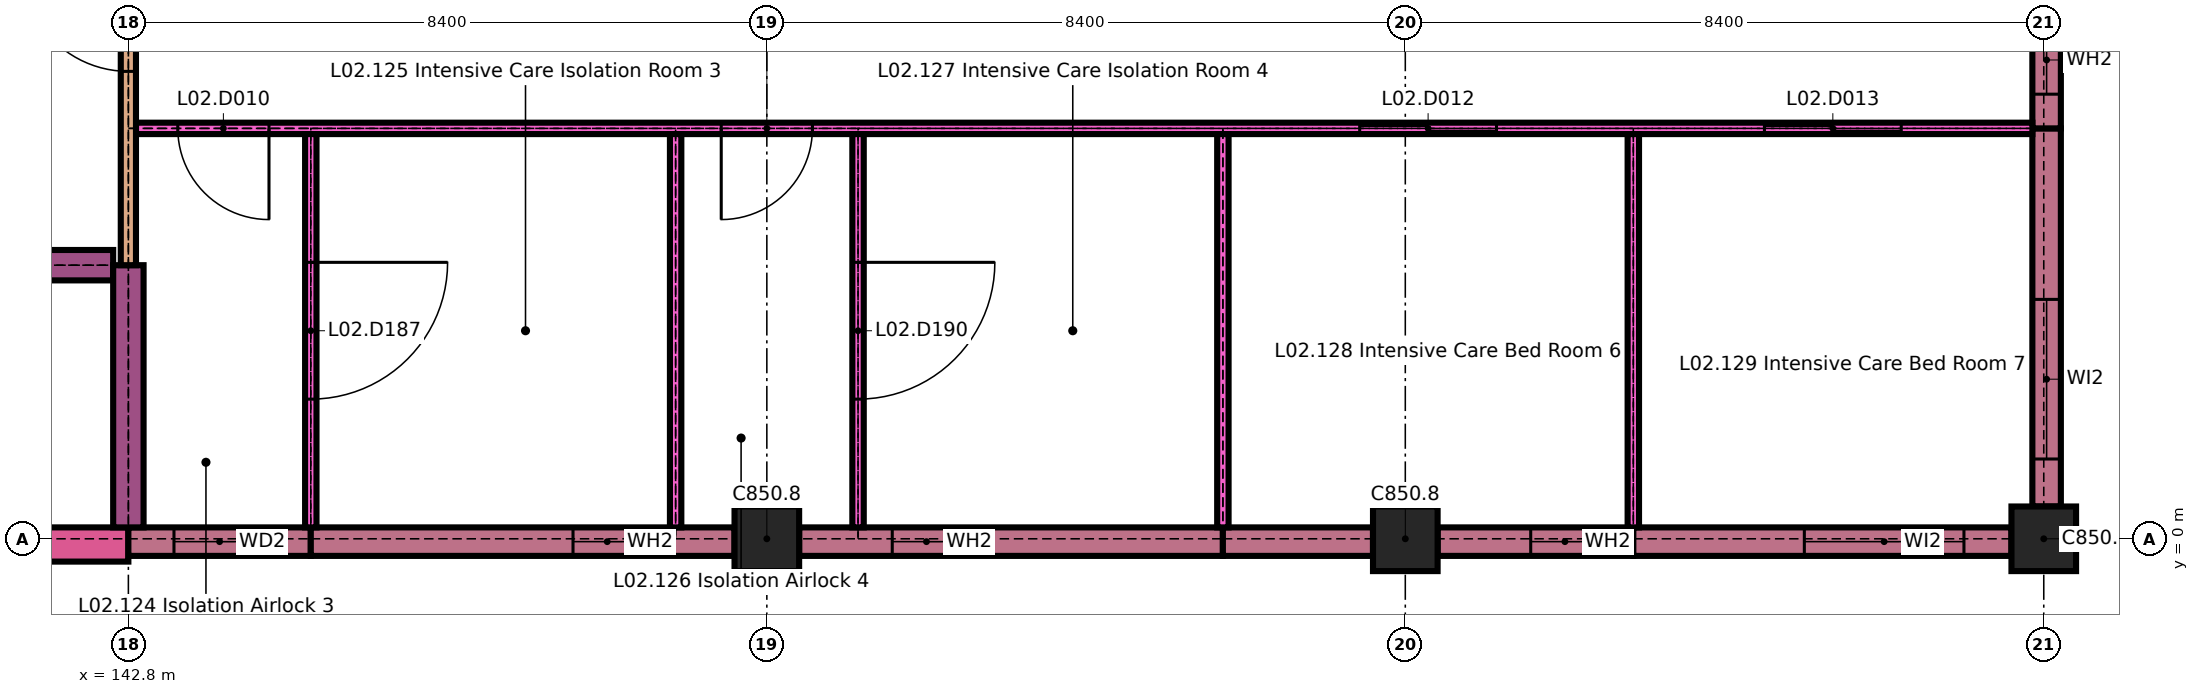
"""IFC4 building model, lengths in metres.
Left out: names, types, materials, properties, quantities, classifications, styles, units other than length and angle.
Written with IfcOpenShell. Run it as: python <this file> out.ifc"""

import sys

from ifc_helpers import new_model, si_unit, direction, frame, frame_2d, origin, origin_2d, place, context, subcontext, project, spatial, rectangle, extrude, element, fill, save


model = new_model("IFC4")
c1 = context("Model", 3, precision=1e-05, world=origin(), true_north=direction((0.0, 1.0)))
c2 = subcontext(c1, "Body", "Model", "MODEL_VIEW")
j1 = project(units=[si_unit("LENGTHUNIT", "METRE"), si_unit("PLANEANGLEUNIT", "RADIAN")], contexts=[c1])
p1 = place(None, origin())
s1 = spatial("IfcSite", under=j1, at=p1, CompositionType="ELEMENT")
p2 = place(p1, origin())
s2 = spatial("IfcBuilding", under=s1, at=p2, CompositionType="ELEMENT")
p3 = place(p2, frame((0.0, 0.0, 8.4)))
s3 = spatial("IfcBuildingStorey", under=s2, at=p3, CompositionType="ELEMENT", Elevation=8.4)
for number, where, z_axis, x_axis in (
    (1, (151.2, 0.0, 0.0), (0.0, 0.0, 1.0), (1.0, 0.0, 0.0)),
    (2, (159.6, 0.0, 0.0), (0.0, 0.0, 1.0), (1.0, 0.0, 0.0)),
    (3, (168.0, 0.0, 0.0), (0.0, 0.0, 1.0), (1.0, 0.0, 0.0)),
):
    element("IfcColumn", number, at=place(p3, frame(where, z_axis=z_axis, x_axis=x_axis)), inside=s3, PredefinedType="COLUMN", context=c2, shape_type="SweptSolid", body=[
        extrude(rectangle(XDim=0.85, YDim=0.85, at=origin_2d()), origin(), (0.0, 0.0, 1.0), 4.2),
    ])
p4 = place(p3, frame((138.95, -0.075, 0.0), z_axis=(0.0, 0.0, 1.0), x_axis=(1.0, 0.0, 0.0)))
e4 = element("IfcWall", 4, at=p4, inside=s3, PredefinedType="SOLIDWALL", context=c2, shape_type="SweptSolid", body=[
    extrude(rectangle(XDim=3.85, YDim=0.45, at=frame_2d((1.925, 0.0))), origin(), (0.0, 0.0, 1.0), 4.2),
])
p5 = place(p3, frame((142.8, -0.038, 0.0), z_axis=(0.0, 0.0, 1.0), x_axis=(1.0, 0.0, 0.0)))
e5 = element("IfcWall", 5, at=p5, inside=s3, PredefinedType="SOLIDWALL", context=c2, shape_type="SweptSolid", body=[
    extrude(rectangle(XDim=2.4, YDim=0.375, at=frame_2d((1.2, 0.0))), origin(), (0.0, 0.0, 1.0), 3.9),
])
p6 = place(p5, frame((0.6, 0.0, 0.9)))
e6 = element("IfcOpeningElement", 6, at=p6, cuts=e5, PredefinedType="OPENING", context=c2, shape_type="SweptSolid", body=[
    extrude(rectangle(XDim=1.2, YDim=2.1, at=frame_2d((0.6, 1.05))), frame((0.0, 0.198, 0.0), z_axis=(0.0, -1.0, 0.0), x_axis=(1.0, 0.0, 0.0)), (0.0, 0.0, 1.0), 0.395),
])
p7 = place(p3, frame((145.2, -0.038, 0.0), z_axis=(0.0, 0.0, 1.0), x_axis=(1.0, 0.0, 0.0)))
e7 = element("IfcWall", 7, at=p7, inside=s3, PredefinedType="SOLIDWALL", context=c2, shape_type="SweptSolid", body=[
    extrude(rectangle(XDim=5.575, YDim=0.375, at=frame_2d((2.788, 0.0))), origin(), (0.0, 0.0, 1.0), 3.9),
])
p8 = place(p7, frame((3.45, 0.0, 0.9)))
e8 = element("IfcOpeningElement", 8, at=p8, cuts=e7, PredefinedType="OPENING", context=c2, shape_type="SweptSolid", body=[
    extrude(rectangle(XDim=0.9, YDim=2.1, at=frame_2d((0.45, 1.05))), frame((0.0, 0.198, 0.0), z_axis=(0.0, -1.0, 0.0), x_axis=(1.0, 0.0, 0.0)), (0.0, 0.0, 1.0), 0.395),
])
p9 = place(p3, frame((151.625, -0.038, 0.0), z_axis=(0.0, 0.0, 1.0), x_axis=(1.0, 0.0, 0.0)))
e9 = element("IfcWall", 9, at=p9, inside=s3, PredefinedType="SOLIDWALL", context=c2, shape_type="SweptSolid", body=[
    extrude(rectangle(XDim=5.575, YDim=0.375, at=frame_2d((2.788, 0.0))), origin(), (0.0, 0.0, 1.0), 3.9),
])
p10 = place(p9, frame((1.225, 0.0, 0.9)))
e10 = element("IfcOpeningElement", 10, at=p10, cuts=e9, PredefinedType="OPENING", context=c2, shape_type="SweptSolid", body=[
    extrude(rectangle(XDim=0.9, YDim=2.1, at=frame_2d((0.45, 1.05))), frame((0.0, 0.198, 0.0), z_axis=(0.0, -1.0, 0.0), x_axis=(1.0, 0.0, 0.0)), (0.0, 0.0, 1.0), 0.395),
])
p11 = place(p3, frame((157.2, -0.038, 0.0), z_axis=(0.0, 0.0, 1.0), x_axis=(1.0, 0.0, 0.0)))
e11 = element("IfcWall", 11, at=p11, inside=s3, PredefinedType="SOLIDWALL", context=c2, shape_type="SweptSolid", body=[
    extrude(rectangle(XDim=1.975, YDim=0.375, at=frame_2d((0.988, 0.0))), origin(), (0.0, 0.0, 1.0), 3.9),
])
p12 = place(p3, frame((160.025, -0.038, 0.0), z_axis=(0.0, 0.0, 1.0), x_axis=(1.0, 0.0, 0.0)))
e12 = element("IfcWall", 12, at=p12, inside=s3, PredefinedType="SOLIDWALL", context=c2, shape_type="SweptSolid", body=[
    extrude(rectangle(XDim=2.575, YDim=0.375, at=frame_2d((1.288, 0.0))), origin(), (0.0, 0.0, 1.0), 3.9),
])
p13 = place(p12, frame((1.225, 0.0, 0.9)))
e13 = element("IfcOpeningElement", 13, at=p13, cuts=e12, PredefinedType="OPENING", context=c2, shape_type="SweptSolid", body=[
    extrude(rectangle(XDim=0.9, YDim=2.1, at=frame_2d((0.45, 1.05))), frame((0.0, 0.198, 0.0), z_axis=(0.0, -1.0, 0.0), x_axis=(1.0, 0.0, 0.0)), (0.0, 0.0, 1.0), 0.395),
])
p14 = place(p3, frame((162.6, -0.038, 0.0), z_axis=(0.0, 0.0, 1.0), x_axis=(1.0, 0.0, 0.0)))
e14 = element("IfcWall", 14, at=p14, inside=s3, PredefinedType="SOLIDWALL", context=c2, shape_type="SweptSolid", body=[
    extrude(rectangle(XDim=4.975, YDim=0.375, at=frame_2d((2.487, 0.0))), origin(), (0.0, 0.0, 1.0), 3.9),
])
p15 = place(p14, frame((2.25, 0.0, 0.9)))
e15 = element("IfcOpeningElement", 15, at=p15, cuts=e14, PredefinedType="OPENING", context=c2, shape_type="SweptSolid", body=[
    extrude(rectangle(XDim=2.1, YDim=2.1, at=frame_2d((1.05, 1.05))), frame((0.0, 0.198, 0.0), z_axis=(0.0, -1.0, 0.0), x_axis=(1.0, 0.0, 0.0)), (0.0, 0.0, 1.0), 0.395),
])
p16 = place(p3, frame((168.038, 0.425, 0.0), z_axis=(0.0, 0.0, 1.0), x_axis=(0.0, 1.0, 0.0)))
e16 = element("IfcWall", 16, at=p16, inside=s3, PredefinedType="SOLIDWALL", context=c2, shape_type="SweptSolid", body=[
    extrude(rectangle(XDim=4.975, YDim=0.375, at=frame_2d((2.487, 0.0))), origin(), (0.0, 0.0, 1.0), 3.9),
])
p17 = place(p16, frame((0.625, 0.0, 0.9)))
e17 = element("IfcOpeningElement", 17, at=p17, cuts=e16, PredefinedType="OPENING", context=c2, shape_type="SweptSolid", body=[
    extrude(rectangle(XDim=2.1, YDim=2.1, at=frame_2d((1.05, 1.05))), frame((0.0, 0.198, 0.0), z_axis=(0.0, -1.0, 0.0), x_axis=(1.0, 0.0, 0.0)), (0.0, 0.0, 1.0), 0.395),
])
p18 = place(p3, frame((168.038, 5.4, 0.0), z_axis=(0.0, 0.0, 1.0), x_axis=(0.0, 1.0, 0.0)))
e18 = element("IfcWall", 18, at=p18, inside=s3, PredefinedType="SOLIDWALL", context=c2, shape_type="SweptSolid", body=[
    extrude(rectangle(XDim=2.575, YDim=0.375, at=frame_2d((1.288, 0.0))), origin(), (0.0, 0.0, 1.0), 3.9),
])
p19 = place(p18, frame((0.45, 0.0, 0.9)))
e19 = element("IfcOpeningElement", 19, at=p19, cuts=e18, PredefinedType="OPENING", context=c2, shape_type="SweptSolid", body=[
    extrude(rectangle(XDim=0.9, YDim=2.1, at=frame_2d((0.45, 1.05))), frame((0.0, 0.198, 0.0), z_axis=(0.0, -1.0, 0.0), x_axis=(1.0, 0.0, 0.0)), (0.0, 0.0, 1.0), 0.395),
])
p20 = place(p3, frame((134.6, 3.6, 0.0), z_axis=(0.0, 0.0, 1.0), x_axis=(1.0, 0.0, 0.0)))
e20 = element("IfcWall", 20, at=p20, inside=s3, PredefinedType="SHEAR", context=c2, shape_type="SweptSolid", body=[
    extrude(rectangle(XDim=8.0, YDim=0.4, at=frame_2d((4.0, 0.0))), origin(), (0.0, 0.0, 1.0), 4.2),
])
p21 = place(p20, frame((0.4, 0.0, 0.0)))
e21 = element("IfcOpeningElement", 21, at=p21, cuts=e20, PredefinedType="OPENING", context=c2, shape_type="SweptSolid", body=[
    extrude(rectangle(XDim=1.2, YDim=2.1, at=frame_2d((0.6, 1.05))), frame((0.0, 0.21, 0.0), z_axis=(0.0, -1.0, 0.0), x_axis=(1.0, 0.0, 0.0)), (0.0, 0.0, 1.0), 0.42),
])
p22 = place(p3, frame((142.9, 5.4, 0.0), z_axis=(0.0, 0.0, 1.0), x_axis=(1.0, 0.0, 0.0)))
e22 = element("IfcWall", 22, at=p22, inside=s3, PredefinedType="PARTITIONING", context=c2, shape_type="SweptSolid", body=[
    extrude(rectangle(XDim=24.95, YDim=0.15, at=frame_2d((12.475, 0.0))), origin(), (0.0, 0.0, 1.0), 4.2),
])
p23 = place(p22, frame((0.55, 0.0, 0.0)))
e23 = element("IfcOpeningElement", 23, at=p23, cuts=e22, PredefinedType="OPENING", context=c2, shape_type="SweptSolid", body=[
    extrude(rectangle(XDim=1.2, YDim=2.1, at=frame_2d((0.6, 1.05))), frame((0.0, 0.085, 0.0), z_axis=(0.0, -1.0, 0.0), x_axis=(1.0, 0.0, 0.0)), (0.0, 0.0, 1.0), 0.17),
])
p24 = place(p22, frame((7.7, 0.0, 0.0)))
e24 = element("IfcOpeningElement", 24, at=p24, cuts=e22, PredefinedType="OPENING", context=c2, shape_type="SweptSolid", body=[
    extrude(rectangle(XDim=1.2, YDim=2.1, at=frame_2d((0.6, 1.05))), frame((0.0, 0.085, 0.0), z_axis=(0.0, -1.0, 0.0), x_axis=(1.0, 0.0, 0.0)), (0.0, 0.0, 1.0), 0.17),
])
p25 = place(p22, frame((16.1, 0.0, 0.0)))
e25 = element("IfcOpeningElement", 25, at=p25, cuts=e22, PredefinedType="OPENING", context=c2, shape_type="SweptSolid", body=[
    extrude(rectangle(XDim=1.8, YDim=2.4, at=frame_2d((0.9, 1.2))), frame((0.0, 0.085, 0.0), z_axis=(0.0, -1.0, 0.0), x_axis=(1.0, 0.0, 0.0)), (0.0, 0.0, 1.0), 0.17),
])
p26 = place(p22, frame((21.425, 0.0, 0.0)))
e26 = element("IfcOpeningElement", 26, at=p26, cuts=e22, PredefinedType="OPENING", context=c2, shape_type="SweptSolid", body=[
    extrude(rectangle(XDim=1.8, YDim=2.4, at=frame_2d((0.9, 1.2))), frame((0.0, 0.085, 0.0), z_axis=(0.0, -1.0, 0.0), x_axis=(1.0, 0.0, 0.0)), (0.0, 0.0, 1.0), 0.17),
])
p27 = place(p3, frame((142.8, 0.15, 0.0), z_axis=(0.0, 0.0, 1.0), x_axis=(0.0, 1.0, 0.0)))
e27 = element("IfcWall", 27, at=p27, inside=s3, PredefinedType="SHEAR", context=c2, shape_type="SweptSolid", body=[
    extrude(rectangle(XDim=3.45, YDim=0.4, at=frame_2d((1.725, 0.0))), origin(), (0.0, 0.0, 1.0), 4.2),
])
p28 = place(p3, frame((142.8, 3.6, 0.0), z_axis=(0.0, 0.0, 1.0), x_axis=(0.0, 1.0, 0.0)))
e28 = element("IfcWall", 28, at=p28, inside=s3, PredefinedType="PARTITIONING", context=c2, shape_type="SweptSolid", body=[
    extrude(rectangle(XDim=4.7, YDim=0.2, at=frame_2d((2.35, 0.0))), origin(), (0.0, 0.0, 1.0), 4.2),
])
p29 = place(p28, frame((2.55, 0.0, 0.0)))
e29 = element("IfcOpeningElement", 29, at=p29, cuts=e28, PredefinedType="OPENING", context=c2, shape_type="SweptSolid", body=[
    extrude(rectangle(XDim=1.4, YDim=2.1, at=frame_2d((0.7, 1.05))), frame((0.0, 0.11, 0.0), z_axis=(0.0, -1.0, 0.0), x_axis=(1.0, 0.0, 0.0)), (0.0, 0.0, 1.0), 0.22),
])
p30 = place(p3, frame((145.2, 0.15, 0.0), z_axis=(0.0, 0.0, 1.0), x_axis=(0.0, 1.0, 0.0)))
e30 = element("IfcWall", 30, at=p30, inside=s3, PredefinedType="PARTITIONING", context=c2, shape_type="SweptSolid", body=[
    extrude(rectangle(XDim=5.175, YDim=0.15, at=frame_2d((2.587, 0.0))), origin(), (0.0, 0.0, 1.0), 4.2),
])
p31 = place(p30, frame((1.688, 0.0, 0.0)))
e31 = element("IfcOpeningElement", 31, at=p31, cuts=e30, PredefinedType="OPENING", context=c2, shape_type="SweptSolid", body=[
    extrude(rectangle(XDim=1.8, YDim=2.4, at=frame_2d((0.9, 1.2))), frame((0.0, 0.085, 0.0), z_axis=(0.0, -1.0, 0.0), x_axis=(1.0, 0.0, 0.0)), (0.0, 0.0, 1.0), 0.17),
])
p32 = place(p3, frame((150.0, 0.15, 0.0), z_axis=(0.0, 0.0, 1.0), x_axis=(0.0, 1.0, 0.0)))
e32 = element("IfcWall", 32, at=p32, inside=s3, PredefinedType="PARTITIONING", context=c2, shape_type="SweptSolid", body=[
    extrude(rectangle(XDim=5.175, YDim=0.15, at=frame_2d((2.587, 0.0))), origin(), (0.0, 0.0, 1.0), 4.2),
])
p33 = place(p3, frame((152.4, 0.15, 0.0), z_axis=(0.0, 0.0, 1.0), x_axis=(0.0, 1.0, 0.0)))
e33 = element("IfcWall", 33, at=p33, inside=s3, PredefinedType="PARTITIONING", context=c2, shape_type="SweptSolid", body=[
    extrude(rectangle(XDim=5.175, YDim=0.15, at=frame_2d((2.587, 0.0))), origin(), (0.0, 0.0, 1.0), 4.2),
])
p34 = place(p33, frame((1.688, 0.0, 0.0)))
e34 = element("IfcOpeningElement", 34, at=p34, cuts=e33, PredefinedType="OPENING", context=c2, shape_type="SweptSolid", body=[
    extrude(rectangle(XDim=1.8, YDim=2.4, at=frame_2d((0.9, 1.2))), frame((0.0, 0.085, 0.0), z_axis=(0.0, -1.0, 0.0), x_axis=(1.0, 0.0, 0.0)), (0.0, 0.0, 1.0), 0.17),
])
for number, where, z_axis, x_axis in (
    (35, (157.2, 0.15, 0.0), (0.0, 0.0, 1.0), (0.0, 1.0, 0.0)),
    (36, (162.6, 0.15, 0.0), (0.0, 0.0, 1.0), (0.0, 1.0, 0.0)),
):
    element("IfcWall", number, at=place(p3, frame(where, z_axis=z_axis, x_axis=x_axis)), inside=s3, PredefinedType="PARTITIONING", context=c2, shape_type="SweptSolid", body=[
        extrude(rectangle(XDim=5.175, YDim=0.15, at=frame_2d((2.587, 0.0))), origin(), (0.0, 0.0, 1.0), 4.2),
    ])
p35 = place(p6, origin())
e37 = element("IfcWindow", 37, at=p35, inside=s3, PartitioningType="SINGLE_PANEL", PredefinedType="WINDOW", context=c2, shape_type="SweptSolid", body=[
    extrude(rectangle(XDim=1.2, YDim=2.1, at=frame_2d((0.6, 1.05))), frame((0.0, 0.03, 0.0), z_axis=(0.0, -1.0, 0.0), x_axis=(1.0, 0.0, 0.0)), (0.0, 0.0, 1.0), 0.06),
])
fill(e6, e37)
p36 = place(p8, origin())
e38 = element("IfcWindow", 38, at=p36, inside=s3, PartitioningType="SINGLE_PANEL", PredefinedType="WINDOW", context=c2, shape_type="SweptSolid", body=[
    extrude(rectangle(XDim=0.9, YDim=2.1, at=frame_2d((0.45, 1.05))), frame((0.0, 0.03, 0.0), z_axis=(0.0, -1.0, 0.0), x_axis=(1.0, 0.0, 0.0)), (0.0, 0.0, 1.0), 0.06),
])
fill(e8, e38)
p37 = place(p10, origin())
e39 = element("IfcWindow", 39, at=p37, inside=s3, PartitioningType="SINGLE_PANEL", PredefinedType="WINDOW", context=c2, shape_type="SweptSolid", body=[
    extrude(rectangle(XDim=0.9, YDim=2.1, at=frame_2d((0.45, 1.05))), frame((0.0, 0.03, 0.0), z_axis=(0.0, -1.0, 0.0), x_axis=(1.0, 0.0, 0.0)), (0.0, 0.0, 1.0), 0.06),
])
fill(e10, e39)
p38 = place(p13, origin())
e40 = element("IfcWindow", 40, at=p38, inside=s3, PartitioningType="SINGLE_PANEL", PredefinedType="WINDOW", context=c2, shape_type="SweptSolid", body=[
    extrude(rectangle(XDim=0.9, YDim=2.1, at=frame_2d((0.45, 1.05))), frame((0.0, 0.03, 0.0), z_axis=(0.0, -1.0, 0.0), x_axis=(1.0, 0.0, 0.0)), (0.0, 0.0, 1.0), 0.06),
])
fill(e13, e40)
p39 = place(p15, origin())
e41 = element("IfcWindow", 41, at=p39, inside=s3, PartitioningType="SINGLE_PANEL", PredefinedType="WINDOW", context=c2, shape_type="SweptSolid", body=[
    extrude(rectangle(XDim=2.1, YDim=2.1, at=frame_2d((1.05, 1.05))), frame((0.0, 0.045, 0.0), z_axis=(0.0, -1.0, 0.0), x_axis=(1.0, 0.0, 0.0)), (0.0, 0.0, 1.0), 0.09),
])
fill(e15, e41)
p40 = place(p17, origin())
e42 = element("IfcWindow", 42, at=p40, inside=s3, PartitioningType="SINGLE_PANEL", PredefinedType="WINDOW", context=c2, shape_type="SweptSolid", body=[
    extrude(rectangle(XDim=2.1, YDim=2.1, at=frame_2d((1.05, 1.05))), frame((0.0, 0.045, 0.0), z_axis=(0.0, -1.0, 0.0), x_axis=(1.0, 0.0, 0.0)), (0.0, 0.0, 1.0), 0.09),
])
fill(e17, e42)
p41 = place(p19, origin())
e43 = element("IfcWindow", 43, at=p41, inside=s3, PartitioningType="SINGLE_PANEL", PredefinedType="WINDOW", context=c2, shape_type="SweptSolid", body=[
    extrude(rectangle(XDim=0.9, YDim=2.1, at=frame_2d((0.45, 1.05))), frame((0.0, 0.03, 0.0), z_axis=(0.0, -1.0, 0.0), x_axis=(1.0, 0.0, 0.0)), (0.0, 0.0, 1.0), 0.06),
])
fill(e19, e43)
p42 = place(p23, origin())
e44 = element("IfcDoor", 44, at=p42, inside=s3, OperationType="SINGLE_SWING_RIGHT", PredefinedType="DOOR", context=c2, shape_type="SweptSolid", body=[
    extrude(rectangle(XDim=1.2, YDim=2.1, at=frame_2d((0.6, 1.05))), frame((0.0, 0.05, 0.0), z_axis=(0.0, -1.0, 0.0), x_axis=(1.0, 0.0, 0.0)), (0.0, 0.0, 1.0), 0.1),
])
fill(e23, e44)
p43 = place(p24, origin())
e45 = element("IfcDoor", 45, at=p43, inside=s3, OperationType="SINGLE_SWING_LEFT", PredefinedType="DOOR", context=c2, shape_type="SweptSolid", body=[
    extrude(rectangle(XDim=1.2, YDim=2.1, at=frame_2d((0.6, 1.05))), frame((0.0, 0.05, 0.0), z_axis=(0.0, -1.0, 0.0), x_axis=(1.0, 0.0, 0.0)), (0.0, 0.0, 1.0), 0.1),
])
fill(e24, e45)
p44 = place(p25, origin())
e46 = element("IfcDoor", 46, at=p44, inside=s3, OperationType="DOUBLE_DOOR_SLIDING", PredefinedType="DOOR", context=c2, shape_type="SweptSolid", body=[
    extrude(rectangle(XDim=1.8, YDim=2.4, at=frame_2d((0.9, 1.2))), frame((0.0, 0.035, 0.0), z_axis=(0.0, -1.0, 0.0), x_axis=(1.0, 0.0, 0.0)), (0.0, 0.0, 1.0), 0.07),
])
fill(e25, e46)
p45 = place(p26, origin())
e47 = element("IfcDoor", 47, at=p45, inside=s3, OperationType="DOUBLE_DOOR_SLIDING", PredefinedType="DOOR", context=c2, shape_type="SweptSolid", body=[
    extrude(rectangle(XDim=1.8, YDim=2.4, at=frame_2d((0.9, 1.2))), frame((0.0, 0.035, 0.0), z_axis=(0.0, -1.0, 0.0), x_axis=(1.0, 0.0, 0.0)), (0.0, 0.0, 1.0), 0.07),
])
fill(e26, e47)
p46 = place(p29, origin())
e48 = element("IfcDoor", 48, at=p46, inside=s3, OperationType="SINGLE_SWING_LEFT", PredefinedType="DOOR", context=c2, shape_type="SweptSolid", body=[
    extrude(rectangle(XDim=1.4, YDim=2.1, at=frame_2d((0.7, 1.05))), frame((0.0, 0.03, 0.0), z_axis=(0.0, -1.0, 0.0), x_axis=(1.0, 0.0, 0.0)), (0.0, 0.0, 1.0), 0.06),
])
fill(e29, e48)
p47 = place(p31, origin())
e49 = element("IfcDoor", 49, at=p47, inside=s3, OperationType="SINGLE_SWING_RIGHT", PredefinedType="DOOR", context=c2, shape_type="SweptSolid", body=[
    extrude(rectangle(XDim=1.8, YDim=2.4, at=frame_2d((0.9, 1.2))), frame((0.0, 0.05, 0.0), z_axis=(0.0, -1.0, 0.0), x_axis=(1.0, 0.0, 0.0)), (0.0, 0.0, 1.0), 0.1),
])
fill(e31, e49)
p48 = place(p34, origin())
e50 = element("IfcDoor", 50, at=p48, inside=s3, OperationType="SINGLE_SWING_RIGHT", PredefinedType="DOOR", context=c2, shape_type="SweptSolid", body=[
    extrude(rectangle(XDim=1.8, YDim=2.4, at=frame_2d((0.9, 1.2))), frame((0.0, 0.05, 0.0), z_axis=(0.0, -1.0, 0.0), x_axis=(1.0, 0.0, 0.0)), (0.0, 0.0, 1.0), 0.1),
])
fill(e34, e50)
save(model, sys.argv[1])
